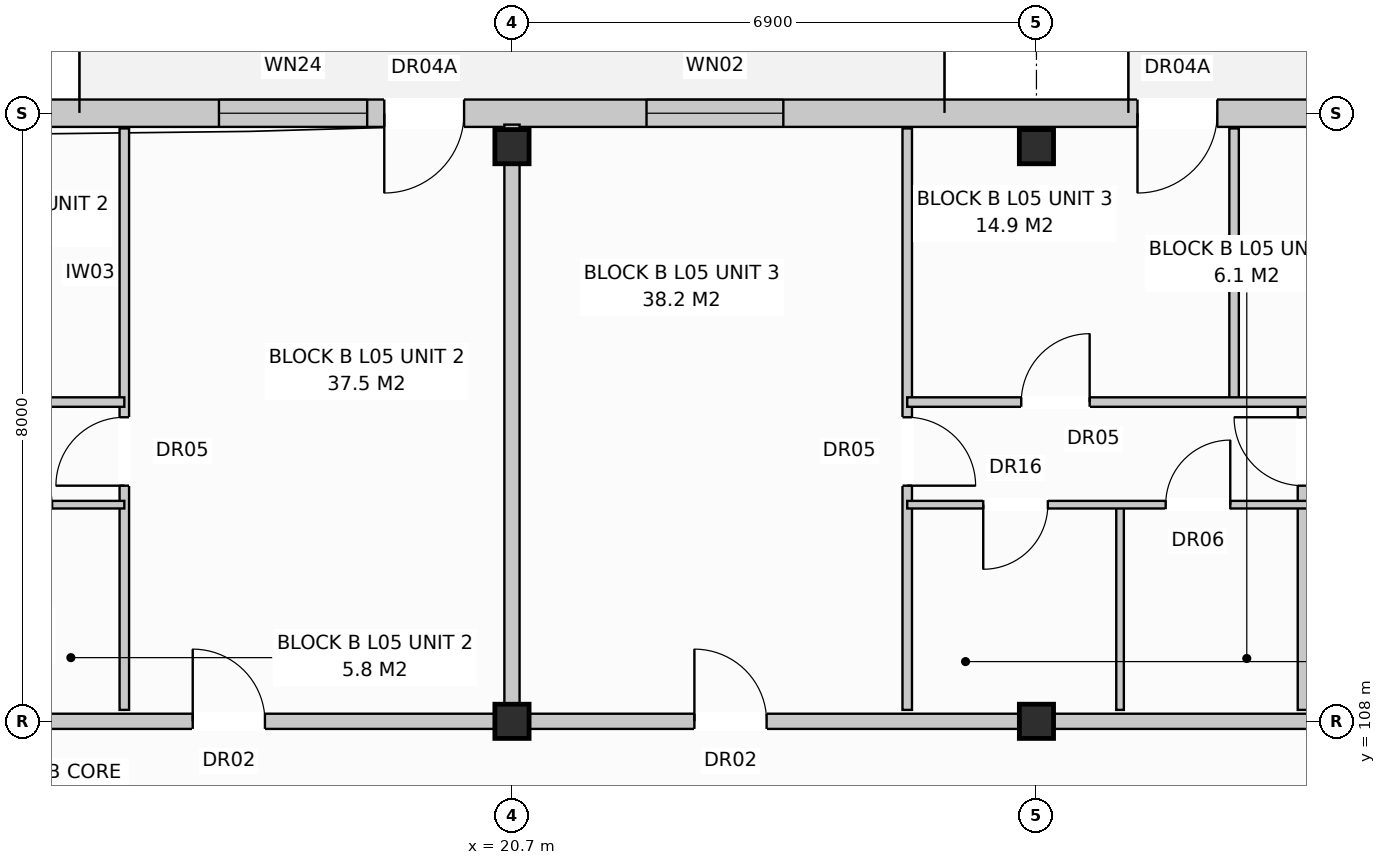
"""IFC4 building model, lengths in metres.
Left out: names, types, materials, properties, quantities, classifications, styles, units other than length and angle.
Written with IfcOpenShell. Run it as: python <this file> out.ifc"""

import sys

from ifc_helpers import new_model, si_unit, direction, frame, frame_2d, origin, origin_with_axes, origin_2d, place, context, subcontext, project, spatial, rectangle, extrude, element, fill, save


model = new_model("IFC4")
c1 = context("Model", 3, precision=1e-05, world=origin(), true_north=direction((0.0, 1.0)))
c2 = subcontext(c1, "Body", "Model", "MODEL_VIEW")
j1 = project(units=[si_unit("LENGTHUNIT", "METRE"), si_unit("PLANEANGLEUNIT", "RADIAN")], contexts=[c1])
p1 = place(None, origin())
s1 = spatial("IfcSite", under=j1, at=p1, CompositionType="ELEMENT")
p2 = place(p1, origin())
s2 = spatial("IfcBuilding", under=s1, at=p2, CompositionType="ELEMENT")
p3 = place(p2, frame((0.0, 0.0, 17.6)))
s3 = spatial("IfcBuildingStorey", under=s2, at=p3, CompositionType="ELEMENT", Elevation=17.6)
for number, where, z_axis, x_axis in (
    (1, (20.7, 108.0, 0.0), (0.0, 0.0, 1.0), (1.0, 0.0, 0.0)),
    (2, (20.7, 115.56, 0.0), (0.0, 0.0, 1.0), (1.0, 0.0, 0.0)),
    (3, (27.6, 108.0, 0.0), (0.0, 0.0, 1.0), (1.0, 0.0, 0.0)),
    (4, (27.6, 115.56, 0.0), (0.0, 0.0, 1.0), (1.0, 0.0, 0.0)),
):
    element("IfcColumn", number, at=place(p3, frame(where, z_axis=z_axis, x_axis=x_axis)), inside=s3, PredefinedType="COLUMN", context=c2, shape_type="SweptSolid", body=[
        extrude(rectangle(XDim=0.45, YDim=0.45, at=origin_2d()), origin(), (0.0, 0.0, 1.0), 3.2),
    ])
p4 = place(p3, frame((0.17, 116.0, 0.0), z_axis=(0.0, 0.0, 1.0), x_axis=(1.0, 0.0, 0.0)))
e5 = element("IfcWall", 5, at=p4, inside=s3, PredefinedType="STANDARD", context=c2, shape_type="SweptSolid", body=[
    extrude(rectangle(XDim=54.86, YDim=0.36, at=frame_2d((27.43, 0.0))), origin(), (0.0, 0.0, 1.0), 2.95),
])
p5 = place(p4, frame((2.459, 0.0, 0.0)))
e6 = element("IfcOpeningElement", 6, at=p5, cuts=e5, PredefinedType="OPENING", context=c2, shape_type="SweptSolid", body=[
    extrude(rectangle(XDim=1.05, YDim=2.12, at=frame_2d((0.525, 1.06))), frame((0.0, 0.192, 0.0), z_axis=(0.0, -1.0, 0.0), x_axis=(1.0, 0.0, 0.0)), (0.0, 0.0, 1.0), 0.384),
])
p6 = place(p4, frame((18.85, 0.0, 0.0)))
e7 = element("IfcOpeningElement", 7, at=p6, cuts=e5, PredefinedType="OPENING", context=c2, shape_type="SweptSolid", body=[
    extrude(rectangle(XDim=1.05, YDim=2.12, at=frame_2d((0.525, 1.06))), frame((0.0, 0.192, 0.0), z_axis=(0.0, -1.0, 0.0), x_axis=(1.0, 0.0, 0.0)), (0.0, 0.0, 1.0), 0.384),
])
p7 = place(p4, frame((28.76, 0.0, 0.0)))
e8 = element("IfcOpeningElement", 8, at=p7, cuts=e5, PredefinedType="OPENING", context=c2, shape_type="SweptSolid", body=[
    extrude(rectangle(XDim=1.05, YDim=2.12, at=frame_2d((0.525, 1.06))), frame((0.0, 0.192, 0.0), z_axis=(0.0, -1.0, 0.0), x_axis=(1.0, 0.0, 0.0)), (0.0, 0.0, 1.0), 0.384),
])
p8 = place(p4, frame((46.45, 0.0, 0.0)))
e9 = element("IfcOpeningElement", 9, at=p8, cuts=e5, PredefinedType="OPENING", context=c2, shape_type="SweptSolid", body=[
    extrude(rectangle(XDim=1.05, YDim=2.12, at=frame_2d((0.525, 1.06))), frame((0.0, 0.192, 0.0), z_axis=(0.0, -1.0, 0.0), x_axis=(1.0, 0.0, 0.0)), (0.0, 0.0, 1.0), 0.384),
])
p9 = place(p4, frame((0.75, 0.0, 0.72)))
e10 = element("IfcOpeningElement", 10, at=p9, cuts=e5, PredefinedType="OPENING", context=c2, shape_type="SweptSolid", body=[
    extrude(rectangle(XDim=1.1, YDim=1.5, at=frame_2d((0.55, 0.75))), frame((0.0, 0.192, 0.0), z_axis=(0.0, -1.0, 0.0), x_axis=(1.0, 0.0, 0.0)), (0.0, 0.0, 1.0), 0.384),
])
p10 = place(p4, frame((4.225, 0.0, 0.8)))
e11 = element("IfcOpeningElement", 11, at=p10, cuts=e5, PredefinedType="OPENING", context=c2, shape_type="SweptSolid", body=[
    extrude(rectangle(XDim=1.95, YDim=1.65, at=frame_2d((0.975, 0.825))), frame((0.0, 0.192, 0.0), z_axis=(0.0, -1.0, 0.0), x_axis=(1.0, 0.0, 0.0)), (0.0, 0.0, 1.0), 0.384),
])
p11 = place(p4, frame((8.0, 0.0, 0.8)))
e12 = element("IfcOpeningElement", 12, at=p11, cuts=e5, PredefinedType="OPENING", context=c2, shape_type="SweptSolid", body=[
    extrude(rectangle(XDim=1.8, YDim=1.7, at=frame_2d((0.9, 0.85))), frame((0.0, 0.192, 0.0), z_axis=(0.0, -1.0, 0.0), x_axis=(1.0, 0.0, 0.0)), (0.0, 0.0, 1.0), 0.384),
])
p12 = place(p4, frame((11.65, 0.0, 0.72)))
e13 = element("IfcOpeningElement", 13, at=p12, cuts=e5, PredefinedType="OPENING", context=c2, shape_type="SweptSolid", body=[
    extrude(rectangle(XDim=1.1, YDim=1.5, at=frame_2d((0.55, 0.75))), frame((0.0, 0.192, 0.0), z_axis=(0.0, -1.0, 0.0), x_axis=(1.0, 0.0, 0.0)), (0.0, 0.0, 1.0), 0.384),
])
p13 = place(p4, frame((16.675, 0.0, 0.8)))
e14 = element("IfcOpeningElement", 14, at=p13, cuts=e5, PredefinedType="OPENING", context=c2, shape_type="SweptSolid", body=[
    extrude(rectangle(XDim=1.95, YDim=1.65, at=frame_2d((0.975, 0.825))), frame((0.0, 0.192, 0.0), z_axis=(0.0, -1.0, 0.0), x_axis=(1.0, 0.0, 0.0)), (0.0, 0.0, 1.0), 0.384),
])
p14 = place(p4, frame((22.3, 0.0, 0.8)))
e15 = element("IfcOpeningElement", 15, at=p14, cuts=e5, PredefinedType="OPENING", context=c2, shape_type="SweptSolid", body=[
    extrude(rectangle(XDim=1.8, YDim=1.7, at=frame_2d((0.9, 0.85))), frame((0.0, 0.192, 0.0), z_axis=(0.0, -1.0, 0.0), x_axis=(1.0, 0.0, 0.0)), (0.0, 0.0, 1.0), 0.384),
])
p15 = place(p4, frame((31.15, 0.0, 0.72)))
e16 = element("IfcOpeningElement", 16, at=p15, cuts=e5, PredefinedType="OPENING", context=c2, shape_type="SweptSolid", body=[
    extrude(rectangle(XDim=1.9, YDim=1.85, at=frame_2d((0.95, 0.925))), frame((0.0, 0.192, 0.0), z_axis=(0.0, -1.0, 0.0), x_axis=(1.0, 0.0, 0.0)), (0.0, 0.0, 1.0), 0.384),
])
p16 = place(p4, frame((36.525, 0.0, 0.8)))
e17 = element("IfcOpeningElement", 17, at=p16, cuts=e5, PredefinedType="OPENING", context=c2, shape_type="SweptSolid", body=[
    extrude(rectangle(XDim=1.95, YDim=1.65, at=frame_2d((0.975, 0.825))), frame((0.0, 0.192, 0.0), z_axis=(0.0, -1.0, 0.0), x_axis=(1.0, 0.0, 0.0)), (0.0, 0.0, 1.0), 0.384),
])
p17 = place(p4, frame((42.3, 0.0, 0.8)))
e18 = element("IfcOpeningElement", 18, at=p17, cuts=e5, PredefinedType="OPENING", context=c2, shape_type="SweptSolid", body=[
    extrude(rectangle(XDim=1.8, YDim=1.7, at=frame_2d((0.9, 0.85))), frame((0.0, 0.192, 0.0), z_axis=(0.0, -1.0, 0.0), x_axis=(1.0, 0.0, 0.0)), (0.0, 0.0, 1.0), 0.384),
])
p18 = place(p4, frame((49.05, 0.0, 0.72)))
e19 = element("IfcOpeningElement", 19, at=p18, cuts=e5, PredefinedType="OPENING", context=c2, shape_type="SweptSolid", body=[
    extrude(rectangle(XDim=1.1, YDim=1.5, at=frame_2d((0.55, 0.75))), frame((0.0, 0.192, 0.0), z_axis=(0.0, -1.0, 0.0), x_axis=(1.0, 0.0, 0.0)), (0.0, 0.0, 1.0), 0.384),
])
p19 = place(p4, frame((52.025, 0.0, 0.8)))
e20 = element("IfcOpeningElement", 20, at=p19, cuts=e5, PredefinedType="OPENING", context=c2, shape_type="SweptSolid", body=[
    extrude(rectangle(XDim=1.95, YDim=1.65, at=frame_2d((0.975, 0.825))), frame((0.0, 0.192, 0.0), z_axis=(0.0, -1.0, 0.0), x_axis=(1.0, 0.0, 0.0)), (0.0, 0.0, 1.0), 0.384),
])
p20 = place(p3, frame((20.7, 108.15, 0.0), z_axis=(0.0, 0.0, 1.0), x_axis=(0.0, 1.0, 0.0)))
e21 = element("IfcWall", 21, at=p20, inside=s3, PredefinedType="PARTITIONING", context=c2, shape_type="SweptSolid", body=[
    extrude(rectangle(XDim=7.7, YDim=0.2, at=frame_2d((3.85, 0.0))), origin(), (0.0, 0.0, 1.0), 2.95),
])
p21 = place(p3, frame((6.9, 108.0, 0.0), z_axis=(0.0, 0.0, 1.0), x_axis=(1.0, 0.0, 0.0)))
e22 = element("IfcWall", 22, at=p21, inside=s3, PredefinedType="PARTITIONING", context=c2, shape_type="SweptSolid", body=[
    extrude(rectangle(XDim=13.8, YDim=0.2, at=frame_2d((6.9, 0.0))), origin(), (0.0, 0.0, 1.0), 2.39),
])
p22 = place(p21, frame((9.6, 0.0, 0.0)))
e23 = element("IfcOpeningElement", 23, at=p22, cuts=e22, PredefinedType="OPENING", context=c2, shape_type="SweptSolid", body=[
    extrude(rectangle(XDim=0.95, YDim=2.15, at=frame_2d((0.475, 1.075))), frame((0.0, 0.112, 0.0), z_axis=(0.0, -1.0, 0.0), x_axis=(1.0, 0.0, 0.0)), (0.0, 0.0, 1.0), 0.224),
])
p23 = place(p3, frame((15.6, 108.15, 0.0), z_axis=(0.0, 0.0, 1.0), x_axis=(0.0, 1.0, 0.0)))
e24 = element("IfcWall", 24, at=p23, inside=s3, PredefinedType="PARTITIONING", context=c2, shape_type="SweptSolid", body=[
    extrude(rectangle(XDim=7.65, YDim=0.125, at=frame_2d((3.825, 0.0))), origin(), (0.0, 0.0, 1.0), 2.95),
])
p24 = place(p23, frame((2.95, 0.0, 0.0)))
e25 = element("IfcOpeningElement", 25, at=p24, cuts=e24, PredefinedType="OPENING", context=c2, shape_type="SweptSolid", body=[
    extrude(rectangle(XDim=0.9, YDim=2.1, at=frame_2d((0.45, 1.05))), frame((0.0, 0.074, 0.0), z_axis=(0.0, -1.0, 0.0), x_axis=(1.0, 0.0, 0.0)), (0.0, 0.0, 1.0), 0.149),
])
p25 = place(p3, frame((7.0, 110.85, 0.0), z_axis=(0.0, 0.0, 1.0), x_axis=(1.0, 0.0, 0.0)))
e26 = element("IfcWall", 26, at=p25, inside=s3, PredefinedType="PARTITIONING", context=c2, shape_type="SweptSolid", body=[
    extrude(rectangle(XDim=8.6, YDim=0.1, at=frame_2d((4.3, 0.0))), origin(), (0.0, 0.0, 1.0), 2.95),
])
p26 = place(p25, frame((1.4, 0.0, 0.0)))
e27 = element("IfcOpeningElement", 27, at=p26, cuts=e26, PredefinedType="OPENING", context=c2, shape_type="SweptSolid", body=[
    extrude(rectangle(XDim=0.85, YDim=2.05, at=frame_2d((0.425, 1.025))), frame((0.0, 0.062, 0.0), z_axis=(0.0, -1.0, 0.0), x_axis=(1.0, 0.0, 0.0)), (0.0, 0.0, 1.0), 0.124),
])
p27 = place(p25, frame((4.65, 0.0, 0.0)))
e28 = element("IfcOpeningElement", 28, at=p27, cuts=e26, PredefinedType="OPENING", context=c2, shape_type="SweptSolid", body=[
    extrude(rectangle(XDim=0.85, YDim=2.05, at=frame_2d((0.425, 1.025))), frame((0.0, 0.062, 0.0), z_axis=(0.0, -1.0, 0.0), x_axis=(1.0, 0.0, 0.0)), (0.0, 0.0, 1.0), 0.124),
])
p28 = place(p25, frame((6.8, 0.0, 0.0)))
e29 = element("IfcOpeningElement", 29, at=p28, cuts=e26, PredefinedType="OPENING", context=c2, shape_type="SweptSolid", body=[
    extrude(rectangle(XDim=0.85, YDim=2.1, at=frame_2d((0.425, 1.05))), frame((0.0, 0.062, 0.0), z_axis=(0.0, -1.0, 0.0), x_axis=(1.0, 0.0, 0.0)), (0.0, 0.0, 1.0), 0.124),
])
p29 = place(p3, frame((11.1, 112.2, 0.0), z_axis=(0.0, 0.0, 1.0), x_axis=(1.0, 0.0, 0.0)))
e30 = element("IfcWall", 30, at=p29, inside=s3, PredefinedType="PARTITIONING", context=c2, shape_type="SweptSolid", body=[
    extrude(rectangle(XDim=4.5, YDim=0.125, at=frame_2d((2.25, 0.0))), origin(), (0.0, 0.0, 1.0), 2.95),
])
p30 = place(p29, frame((1.6, 0.0, 0.0)))
e31 = element("IfcOpeningElement", 31, at=p30, cuts=e30, PredefinedType="OPENING", context=c2, shape_type="SweptSolid", body=[
    extrude(rectangle(XDim=0.9, YDim=2.1, at=frame_2d((0.45, 1.05))), frame((0.0, 0.074, 0.0), z_axis=(0.0, -1.0, 0.0), x_axis=(1.0, 0.0, 0.0)), (0.0, 0.0, 1.0), 0.149),
])
p31 = place(p3, frame((20.7, 108.0, 0.0), z_axis=(0.0, 0.0, 1.0), x_axis=(1.0, 0.0, 0.0)))
e32 = element("IfcWall", 32, at=p31, inside=s3, PredefinedType="PARTITIONING", context=c2, shape_type="SweptSolid", body=[
    extrude(rectangle(XDim=13.8, YDim=0.2, at=frame_2d((6.9, 0.0))), origin(), (0.0, 0.0, 1.0), 2.39),
])
p32 = place(p31, frame((2.4, 0.0, 0.0)))
e33 = element("IfcOpeningElement", 33, at=p32, cuts=e32, PredefinedType="OPENING", context=c2, shape_type="SweptSolid", body=[
    extrude(rectangle(XDim=0.95, YDim=2.15, at=frame_2d((0.475, 1.075))), frame((0.0, 0.112, 0.0), z_axis=(0.0, -1.0, 0.0), x_axis=(1.0, 0.0, 0.0)), (0.0, 0.0, 1.0), 0.224),
])
p33 = place(p3, frame((25.9, 108.15, 0.0), z_axis=(0.0, 0.0, 1.0), x_axis=(0.0, 1.0, 0.0)))
e34 = element("IfcWall", 34, at=p33, inside=s3, PredefinedType="PARTITIONING", context=c2, shape_type="SweptSolid", body=[
    extrude(rectangle(XDim=7.65, YDim=0.125, at=frame_2d((3.825, 0.0))), origin(), (0.0, 0.0, 1.0), 2.95),
])
p34 = place(p33, frame((2.95, 0.0, 0.0)))
e35 = element("IfcOpeningElement", 35, at=p34, cuts=e34, PredefinedType="OPENING", context=c2, shape_type="SweptSolid", body=[
    extrude(rectangle(XDim=0.9, YDim=2.1, at=frame_2d((0.45, 1.05))), frame((0.0, 0.074, 0.0), z_axis=(0.0, -1.0, 0.0), x_axis=(1.0, 0.0, 0.0)), (0.0, 0.0, 1.0), 0.149),
])
p35 = place(p3, frame((28.7, 108.15, 0.0), z_axis=(0.0, 0.0, 1.0), x_axis=(0.0, 1.0, 0.0)))
e36 = element("IfcWall", 36, at=p35, inside=s3, PredefinedType="PARTITIONING", context=c2, shape_type="SweptSolid", body=[
    extrude(rectangle(XDim=2.7, YDim=0.1, at=frame_2d((1.35, 0.0))), origin(), (0.0, 0.0, 1.0), 2.59),
])
p36 = place(p3, frame((31.1, 108.15, 0.0), z_axis=(0.0, 0.0, 1.0), x_axis=(0.0, 1.0, 0.0)))
e37 = element("IfcWall", 37, at=p36, inside=s3, PredefinedType="PARTITIONING", context=c2, shape_type="SweptSolid", body=[
    extrude(rectangle(XDim=4.05, YDim=0.125, at=frame_2d((2.025, 0.0))), origin(), (0.0, 0.0, 1.0), 2.95),
])
p37 = place(p36, frame((2.95, 0.0, 0.0)))
e38 = element("IfcOpeningElement", 38, at=p37, cuts=e37, PredefinedType="OPENING", context=c2, shape_type="SweptSolid", body=[
    extrude(rectangle(XDim=0.9, YDim=2.1, at=frame_2d((0.45, 1.05))), frame((0.0, 0.074, 0.0), z_axis=(0.0, -1.0, 0.0), x_axis=(1.0, 0.0, 0.0)), (0.0, 0.0, 1.0), 0.149),
])
p38 = place(p3, frame((30.2, 112.2, 0.0), z_axis=(0.0, 0.0, 1.0), x_axis=(0.0, 1.0, 0.0)))
e39 = element("IfcWall", 39, at=p38, inside=s3, PredefinedType="PARTITIONING", context=c2, shape_type="SweptSolid", body=[
    extrude(rectangle(XDim=3.6, YDim=0.125, at=frame_2d((1.8, 0.0))), origin(), (0.0, 0.0, 1.0), 2.95),
])
p39 = place(p3, frame((25.9, 110.85, 0.0), z_axis=(0.0, 0.0, 1.0), x_axis=(1.0, 0.0, 0.0)))
e40 = element("IfcWall", 40, at=p39, inside=s3, PredefinedType="PARTITIONING", context=c2, shape_type="SweptSolid", body=[
    extrude(rectangle(XDim=8.5, YDim=0.1, at=frame_2d((4.25, 0.0))), origin(), (0.0, 0.0, 1.0), 2.95),
])
p40 = place(p39, frame((1.0, 0.0, 0.0)))
e41 = element("IfcOpeningElement", 41, at=p40, cuts=e40, PredefinedType="OPENING", context=c2, shape_type="SweptSolid", body=[
    extrude(rectangle(XDim=0.85, YDim=2.1, at=frame_2d((0.425, 1.05))), frame((0.0, 0.062, 0.0), z_axis=(0.0, -1.0, 0.0), x_axis=(1.0, 0.0, 0.0)), (0.0, 0.0, 1.0), 0.124),
])
p41 = place(p39, frame((3.4, 0.0, 0.0)))
e42 = element("IfcOpeningElement", 42, at=p41, cuts=e40, PredefinedType="OPENING", context=c2, shape_type="SweptSolid", body=[
    extrude(rectangle(XDim=0.85, YDim=2.05, at=frame_2d((0.425, 1.025))), frame((0.0, 0.062, 0.0), z_axis=(0.0, -1.0, 0.0), x_axis=(1.0, 0.0, 0.0)), (0.0, 0.0, 1.0), 0.124),
])
p42 = place(p39, frame((6.2, 0.0, 0.0)))
e43 = element("IfcOpeningElement", 43, at=p42, cuts=e40, PredefinedType="OPENING", context=c2, shape_type="SweptSolid", body=[
    extrude(rectangle(XDim=0.85, YDim=2.05, at=frame_2d((0.425, 1.025))), frame((0.0, 0.062, 0.0), z_axis=(0.0, -1.0, 0.0), x_axis=(1.0, 0.0, 0.0)), (0.0, 0.0, 1.0), 0.124),
])
p43 = place(p3, frame((25.9, 112.2, 0.0), z_axis=(0.0, 0.0, 1.0), x_axis=(1.0, 0.0, 0.0)))
e44 = element("IfcWall", 44, at=p43, inside=s3, PredefinedType="PARTITIONING", context=c2, shape_type="SweptSolid", body=[
    extrude(rectangle(XDim=8.5, YDim=0.125, at=frame_2d((4.25, 0.0))), origin(), (0.0, 0.0, 1.0), 2.95),
])
p44 = place(p43, frame((1.5, 0.0, 0.0)))
e45 = element("IfcOpeningElement", 45, at=p44, cuts=e44, PredefinedType="OPENING", context=c2, shape_type="SweptSolid", body=[
    extrude(rectangle(XDim=0.9, YDim=2.1, at=frame_2d((0.45, 1.05))), frame((0.0, 0.074, 0.0), z_axis=(0.0, -1.0, 0.0), x_axis=(1.0, 0.0, 0.0)), (0.0, 0.0, 1.0), 0.149),
])
p45 = place(p43, frame((5.6, 0.0, 0.0)))
e46 = element("IfcOpeningElement", 46, at=p45, cuts=e44, PredefinedType="OPENING", context=c2, shape_type="SweptSolid", body=[
    extrude(rectangle(XDim=0.9, YDim=2.1, at=frame_2d((0.45, 1.05))), frame((0.0, 0.074, 0.0), z_axis=(0.0, -1.0, 0.0), x_axis=(1.0, 0.0, 0.0)), (0.0, 0.0, 1.0), 0.149),
])
p46 = place(p6, frame((1.05, 0.0, 0.0), z_axis=(0.0, 0.0, 1.0), x_axis=(-1.0, 0.0, 0.0)))
e47 = element("IfcDoor", 47, at=p46, inside=s3, OperationType="SINGLE_SWING_LEFT", PredefinedType="DOOR", context=c2, shape_type="SweptSolid", body=[
    extrude(rectangle(XDim=1.05, YDim=2.12, at=frame_2d((0.525, 1.06))), frame((0.0, 0.025, 0.0), z_axis=(0.0, -1.0, 0.0), x_axis=(1.0, 0.0, 0.0)), (0.0, 0.0, 1.0), 0.05),
])
fill(e7, e47)
p47 = place(p7, frame((1.05, 0.0, 0.0), z_axis=(0.0, 0.0, 1.0), x_axis=(-1.0, 0.0, 0.0)))
e48 = element("IfcDoor", 48, at=p47, inside=s3, OperationType="SINGLE_SWING_LEFT", PredefinedType="DOOR", context=c2, shape_type="SweptSolid", body=[
    extrude(rectangle(XDim=1.05, YDim=2.12, at=frame_2d((0.525, 1.06))), frame((0.0, 0.025, 0.0), z_axis=(0.0, -1.0, 0.0), x_axis=(1.0, 0.0, 0.0)), (0.0, 0.0, 1.0), 0.05),
])
fill(e8, e48)
p48 = place(p13, origin_with_axes())
e49 = element("IfcWindow", 49, at=p48, inside=s3, PartitioningType="SINGLE_PANEL", PredefinedType="WINDOW", context=c2, shape_type="SweptSolid", body=[
    extrude(rectangle(XDim=1.95, YDim=1.65, at=frame_2d((0.975, 0.825))), frame((0.0, 0.03, 0.0), z_axis=(0.0, -1.0, 0.0), x_axis=(1.0, 0.0, 0.0)), (0.0, 0.0, 1.0), 0.06),
])
fill(e14, e49)
p49 = place(p14, origin_with_axes())
e50 = element("IfcWindow", 50, at=p49, inside=s3, PartitioningType="SINGLE_PANEL", PredefinedType="WINDOW", context=c2, shape_type="SweptSolid", body=[
    extrude(rectangle(XDim=1.8, YDim=1.7, at=frame_2d((0.9, 0.85))), frame((0.0, 0.03, 0.0), z_axis=(0.0, -1.0, 0.0), x_axis=(1.0, 0.0, 0.0)), (0.0, 0.0, 1.0), 0.06),
])
fill(e15, e50)
p50 = place(p22, origin_with_axes())
e51 = element("IfcDoor", 51, at=p50, inside=s3, OperationType="SINGLE_SWING_LEFT", PredefinedType="DOOR", context=c2, shape_type="SweptSolid", body=[
    extrude(rectangle(XDim=0.95, YDim=2.15, at=frame_2d((0.475, 1.075))), frame((0.0, 0.025, 0.0), z_axis=(0.0, -1.0, 0.0), x_axis=(1.0, 0.0, 0.0)), (0.0, 0.0, 1.0), 0.05),
])
fill(e23, e51)
p51 = place(p24, origin_with_axes())
e52 = element("IfcDoor", 52, at=p51, inside=s3, OperationType="SINGLE_SWING_LEFT", PredefinedType="DOOR", context=c2, shape_type="SweptSolid", body=[
    extrude(rectangle(XDim=0.9, YDim=2.1, at=frame_2d((0.45, 1.05))), frame((0.0, 0.025, 0.0), z_axis=(0.0, -1.0, 0.0), x_axis=(1.0, 0.0, 0.0)), (0.0, 0.0, 1.0), 0.05),
])
fill(e25, e52)
p52 = place(p28, origin_with_axes())
e53 = element("IfcDoor", 53, at=p52, inside=s3, OperationType="SINGLE_SWING_LEFT", PredefinedType="DOOR", context=c2, shape_type="SweptSolid", body=[
    extrude(rectangle(XDim=0.85, YDim=2.1, at=frame_2d((0.425, 1.05))), frame((0.0, 0.025, 0.0), z_axis=(0.0, -1.0, 0.0), x_axis=(1.0, 0.0, 0.0)), (0.0, 0.0, 1.0), 0.05),
])
fill(e29, e53)
p53 = place(p32, origin_with_axes())
e54 = element("IfcDoor", 54, at=p53, inside=s3, OperationType="SINGLE_SWING_LEFT", PredefinedType="DOOR", context=c2, shape_type="SweptSolid", body=[
    extrude(rectangle(XDim=0.95, YDim=2.15, at=frame_2d((0.475, 1.075))), frame((0.0, 0.025, 0.0), z_axis=(0.0, -1.0, 0.0), x_axis=(1.0, 0.0, 0.0)), (0.0, 0.0, 1.0), 0.05),
])
fill(e33, e54)
p54 = place(p34, frame((0.9, 0.0, 0.0), z_axis=(0.0, 0.0, 1.0), x_axis=(-1.0, 0.0, 0.0)))
e55 = element("IfcDoor", 55, at=p54, inside=s3, OperationType="SINGLE_SWING_LEFT", PredefinedType="DOOR", context=c2, shape_type="SweptSolid", body=[
    extrude(rectangle(XDim=0.9, YDim=2.1, at=frame_2d((0.45, 1.05))), frame((0.0, 0.025, 0.0), z_axis=(0.0, -1.0, 0.0), x_axis=(1.0, 0.0, 0.0)), (0.0, 0.0, 1.0), 0.05),
])
fill(e35, e55)
p55 = place(p37, origin_with_axes())
e56 = element("IfcDoor", 56, at=p55, inside=s3, OperationType="SINGLE_SWING_RIGHT", PredefinedType="DOOR", context=c2, shape_type="SweptSolid", body=[
    extrude(rectangle(XDim=0.9, YDim=2.1, at=frame_2d((0.45, 1.05))), frame((0.0, 0.025, 0.0), z_axis=(0.0, -1.0, 0.0), x_axis=(1.0, 0.0, 0.0)), (0.0, 0.0, 1.0), 0.05),
])
fill(e38, e56)
p56 = place(p40, frame((0.85, 0.0, 0.0), z_axis=(0.0, 0.0, 1.0), x_axis=(-1.0, 0.0, 0.0)))
e57 = element("IfcDoor", 57, at=p56, inside=s3, OperationType="SINGLE_SWING_LEFT", PredefinedType="DOOR", context=c2, shape_type="SweptSolid", body=[
    extrude(rectangle(XDim=0.85, YDim=2.1, at=frame_2d((0.425, 1.05))), frame((0.0, 0.025, 0.0), z_axis=(0.0, -1.0, 0.0), x_axis=(1.0, 0.0, 0.0)), (0.0, 0.0, 1.0), 0.05),
])
fill(e41, e57)
p57 = place(p41, origin_with_axes())
e58 = element("IfcDoor", 58, at=p57, inside=s3, OperationType="SINGLE_SWING_RIGHT", PredefinedType="DOOR", context=c2, shape_type="SweptSolid", body=[
    extrude(rectangle(XDim=0.85, YDim=2.05, at=frame_2d((0.425, 1.025))), frame((0.0, 0.025, 0.0), z_axis=(0.0, -1.0, 0.0), x_axis=(1.0, 0.0, 0.0)), (0.0, 0.0, 1.0), 0.05),
])
fill(e42, e58)
p58 = place(p44, origin_with_axes())
e59 = element("IfcDoor", 59, at=p58, inside=s3, OperationType="SINGLE_SWING_RIGHT", PredefinedType="DOOR", context=c2, shape_type="SweptSolid", body=[
    extrude(rectangle(XDim=0.9, YDim=2.1, at=frame_2d((0.45, 1.05))), frame((0.0, 0.025, 0.0), z_axis=(0.0, -1.0, 0.0), x_axis=(1.0, 0.0, 0.0)), (0.0, 0.0, 1.0), 0.05),
])
fill(e45, e59)
save(model, sys.argv[1])
